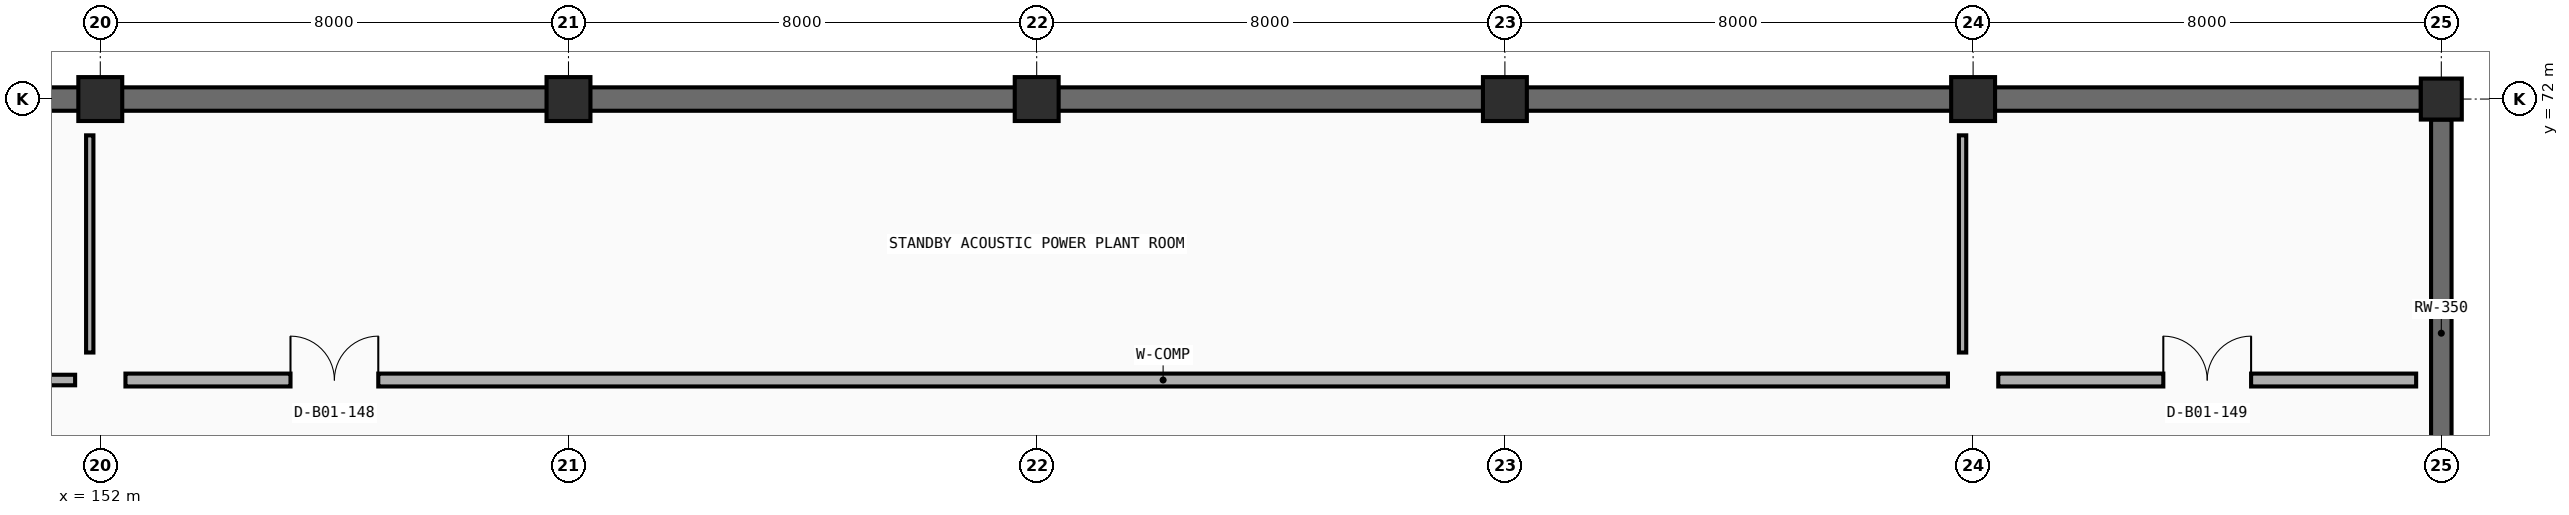
"""IFC4 building model, lengths in metres.
Left out: names, types, materials, properties, quantities, classifications, styles, units other than length and angle.
Written with IfcOpenShell. Run it as: python <this file> out.ifc"""

import sys

from ifc_helpers import new_model, si_unit, direction, frame, frame_2d, origin, origin_2d, place, context, subcontext, project, spatial, rectangle, extrude, element, fill, save


model = new_model("IFC4")
c1 = context("Model", 3, precision=1e-05, world=origin(), true_north=direction((0.0, 1.0)))
c2 = subcontext(c1, "Body", "Model", "MODEL_VIEW")
j1 = project(units=[si_unit("LENGTHUNIT", "METRE"), si_unit("PLANEANGLEUNIT", "RADIAN")], contexts=[c1])
p1 = place(None, origin())
s1 = spatial("IfcSite", under=j1, at=p1, CompositionType="ELEMENT")
p2 = place(p1, origin())
s2 = spatial("IfcBuilding", under=s1, at=p2, CompositionType="ELEMENT")
p3 = place(p2, frame((0.0, 0.0, -4.5)))
s3 = spatial("IfcBuildingStorey", under=s2, at=p3, CompositionType="ELEMENT", Elevation=-4.5)
for number, where, z_axis, x_axis in (
    (1, (152.0, 72.0, -0.405), (0.0, 0.0, 1.0), (1.0, 0.0, 0.0)),
    (2, (160.0, 72.0, -0.405), (0.0, 0.0, 1.0), (1.0, 0.0, 0.0)),
    (3, (168.0, 72.0, -0.405), (0.0, 0.0, 1.0), (1.0, 0.0, 0.0)),
    (4, (176.0, 72.0, -0.405), (0.0, 0.0, 1.0), (1.0, 0.0, 0.0)),
    (5, (184.0, 72.0, -0.405), (0.0, 0.0, 1.0), (1.0, 0.0, 0.0)),
):
    element("IfcColumn", number, at=place(p3, frame(where, z_axis=z_axis, x_axis=x_axis)), inside=s3, PredefinedType="COLUMN", context=c2, shape_type="SweptSolid", body=[
        extrude(rectangle(XDim=0.75, YDim=0.75, at=origin_2d()), origin(), (0.0, 0.0, 1.0), 4.905),
    ])
p4 = place(p3, frame((192.0, 72.0, -0.405), z_axis=(0.0, 0.0, 1.0), x_axis=(1.0, 0.0, 0.0)))
e6 = element("IfcColumn", 6, at=p4, inside=s3, PredefinedType="COLUMN", context=c2, shape_type="SweptSolid", body=[
    extrude(rectangle(XDim=0.7, YDim=0.7, at=origin_2d()), origin(), (0.0, 0.0, 1.0), 4.905),
])
for number, where, z_axis, x_axis in (
    (7, (144.35, 72.0, 0.0), (0.0, 0.0, 1.0), (1.0, 0.0, 0.0)),
    (8, (152.35, 72.0, 0.0), (0.0, 0.0, 1.0), (1.0, 0.0, 0.0)),
    (9, (160.35, 72.0, 0.0), (0.0, 0.0, 1.0), (1.0, 0.0, 0.0)),
    (10, (168.35, 72.0, 0.0), (0.0, 0.0, 1.0), (1.0, 0.0, 0.0)),
    (11, (176.35, 72.0, 0.0), (0.0, 0.0, 1.0), (1.0, 0.0, 0.0)),
    (12, (184.35, 72.0, 0.0), (0.0, 0.0, 1.0), (1.0, 0.0, 0.0)),
):
    element("IfcWall", number, at=place(p3, frame(where, z_axis=z_axis, x_axis=x_axis)), inside=s3, PredefinedType="USERDEFINED", context=c2, shape_type="SweptSolid", body=[
        extrude(rectangle(XDim=7.3, YDim=0.4, at=frame_2d((3.65, 0.0))), origin(), (0.0, 0.0, 1.0), 4.095),
    ])
p5 = place(p3, frame((192.0, 71.65, 0.0), z_axis=(0.0, 0.0, 1.0), x_axis=(0.0, -1.0, 0.0)))
e13 = element("IfcWall", 13, at=p5, inside=s3, PredefinedType="USERDEFINED", context=c2, shape_type="SweptSolid", body=[
    extrude(rectangle(XDim=7.3, YDim=0.35, at=frame_2d((3.65, 0.0))), origin(), (0.0, 0.0, 1.0), 4.095),
])
p6 = place(p3, frame((120.43, 67.2, 0.0), z_axis=(0.0, 0.0, 1.0), x_axis=(1.0, 0.0, 0.0)))
e14 = element("IfcWall", 14, at=p6, inside=s3, PredefinedType="PARTITIONING", context=c2, shape_type="SweptSolid", body=[
    extrude(rectangle(XDim=31.14, YDim=0.18, at=frame_2d((15.57, 0.0))), origin(), (0.0, 0.0, 1.0), 3.6),
])
p7 = place(p6, frame((2.97, 0.0, 0.0)))
e15 = element("IfcOpeningElement", 15, at=p7, cuts=e14, PredefinedType="OPENING", context=c2, shape_type="SweptSolid", body=[
    extrude(rectangle(XDim=1.2, YDim=2.15, at=frame_2d((0.6, 1.075))), frame((0.0, 0.1, 0.0), z_axis=(0.0, -1.0, 0.0), x_axis=(1.0, 0.0, 0.0)), (0.0, 0.0, 1.0), 0.2),
])
p8 = place(p3, frame((151.82, 67.67, 0.0), z_axis=(0.0, 0.0, 1.0), x_axis=(0.0, 1.0, 0.0)))
e16 = element("IfcWall", 16, at=p8, inside=s3, PredefinedType="PARTITIONING", context=c2, shape_type="SweptSolid", body=[
    extrude(rectangle(XDim=3.71, YDim=0.125, at=frame_2d((1.855, 0.0))), origin(), (0.0, 0.0, 1.0), 3.27),
])
p9 = place(p3, frame((152.43, 67.2, 0.0), z_axis=(0.0, 0.0, 1.0), x_axis=(1.0, 0.0, 0.0)))
e17 = element("IfcWall", 17, at=p9, inside=s3, PredefinedType="PARTITIONING", context=c2, shape_type="SweptSolid", body=[
    extrude(rectangle(XDim=31.14, YDim=0.22, at=frame_2d((15.57, 0.0))), origin(), (0.0, 0.0, 1.0), 3.6),
])
p10 = place(p9, frame((2.82, 0.0, 0.0)))
e18 = element("IfcOpeningElement", 18, at=p10, cuts=e17, PredefinedType="OPENING", context=c2, shape_type="SweptSolid", body=[
    extrude(rectangle(XDim=1.5, YDim=2.2, at=frame_2d((0.75, 1.1))), frame((0.0, 0.12, 0.0), z_axis=(0.0, -1.0, 0.0), x_axis=(1.0, 0.0, 0.0)), (0.0, 0.0, 1.0), 0.24),
])
p11 = place(p3, frame((183.82, 67.67, 0.0), z_axis=(0.0, 0.0, 1.0), x_axis=(0.0, 1.0, 0.0)))
e19 = element("IfcWall", 19, at=p11, inside=s3, PredefinedType="PARTITIONING", context=c2, shape_type="SweptSolid", body=[
    extrude(rectangle(XDim=3.71, YDim=0.125, at=frame_2d((1.855, 0.0))), origin(), (0.0, 0.0, 1.0), 3.27),
])
p12 = place(p3, frame((184.43, 67.2, 0.0), z_axis=(0.0, 0.0, 1.0), x_axis=(1.0, 0.0, 0.0)))
e20 = element("IfcWall", 20, at=p12, inside=s3, PredefinedType="PARTITIONING", context=c2, shape_type="SweptSolid", body=[
    extrude(rectangle(XDim=7.14, YDim=0.22, at=frame_2d((3.57, 0.0))), origin(), (0.0, 0.0, 1.0), 3.6),
])
p13 = place(p12, frame((2.82, 0.0, 0.0)))
e21 = element("IfcOpeningElement", 21, at=p13, cuts=e20, PredefinedType="OPENING", context=c2, shape_type="SweptSolid", body=[
    extrude(rectangle(XDim=1.5, YDim=2.2, at=frame_2d((0.75, 1.1))), frame((0.0, 0.12, 0.0), z_axis=(0.0, -1.0, 0.0), x_axis=(1.0, 0.0, 0.0)), (0.0, 0.0, 1.0), 0.24),
])
p14 = place(p10, origin())
e22 = element("IfcDoor", 22, at=p14, inside=s3, OperationType="DOUBLE_DOOR_SINGLE_SWING", PredefinedType="DOOR", context=c2, shape_type="SweptSolid", body=[
    extrude(rectangle(XDim=1.5, YDim=2.2, at=frame_2d((0.75, 1.1))), frame((0.0, 0.025, 0.0), z_axis=(0.0, -1.0, 0.0), x_axis=(1.0, 0.0, 0.0)), (0.0, 0.0, 1.0), 0.05),
])
fill(e18, e22)
p15 = place(p13, origin())
e23 = element("IfcDoor", 23, at=p15, inside=s3, OperationType="DOUBLE_DOOR_SINGLE_SWING", PredefinedType="DOOR", context=c2, shape_type="SweptSolid", body=[
    extrude(rectangle(XDim=1.5, YDim=2.2, at=frame_2d((0.75, 1.1))), frame((0.0, 0.025, 0.0), z_axis=(0.0, -1.0, 0.0), x_axis=(1.0, 0.0, 0.0)), (0.0, 0.0, 1.0), 0.05),
])
fill(e21, e23)
save(model, sys.argv[1])
